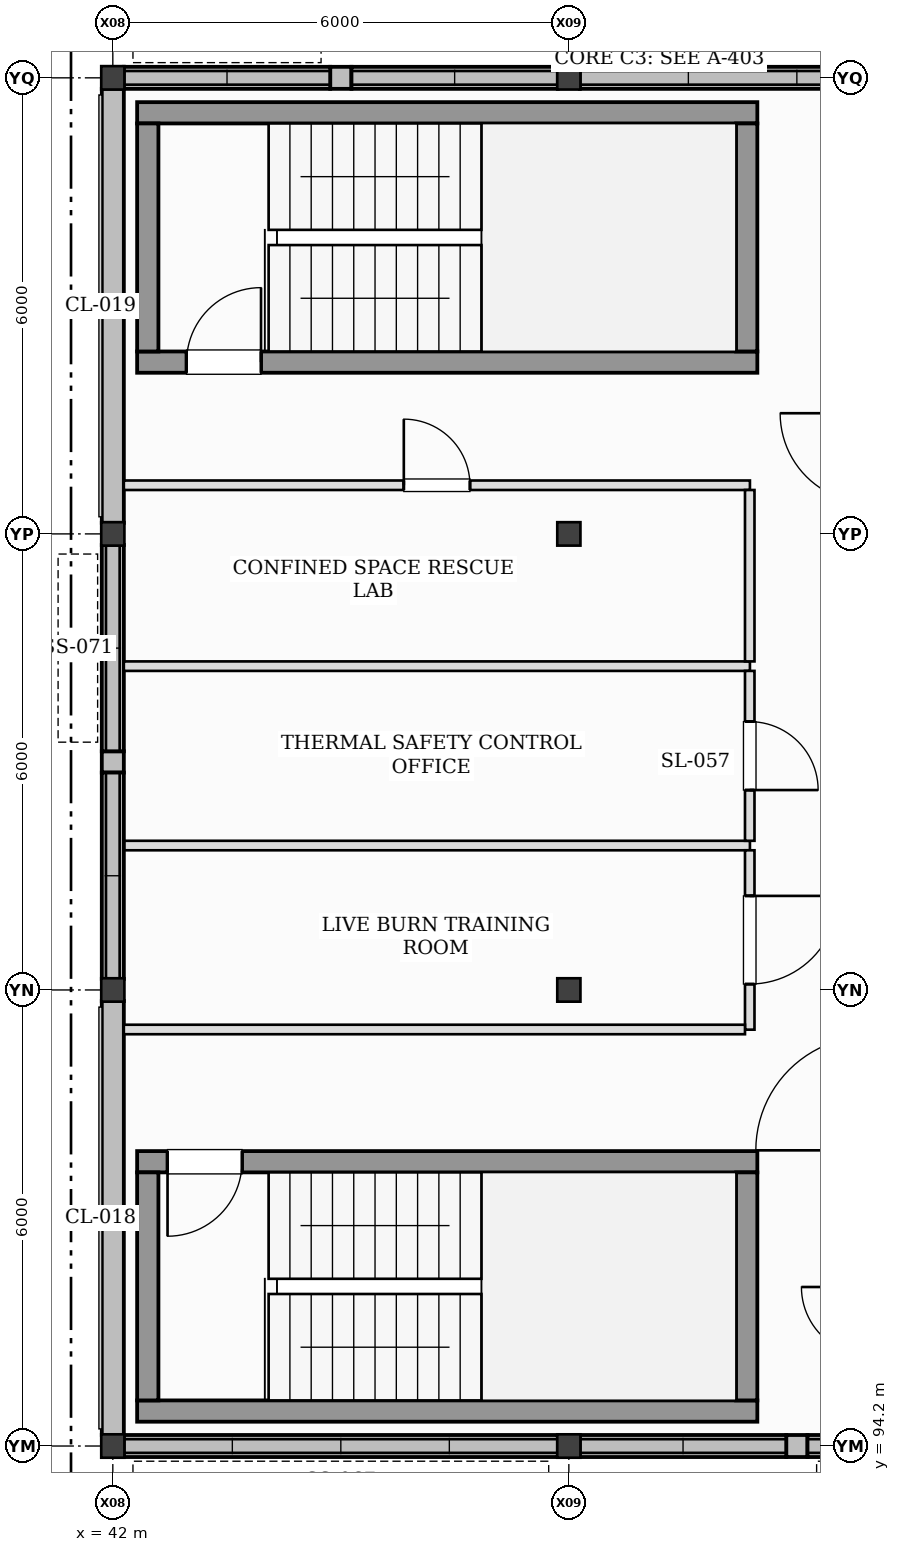
"""IFC4 building model, lengths in metres.
Left out: names, types, materials, properties, quantities, classifications, styles, units other than length and angle.
Written with IfcOpenShell. Run it as: python <this file> out.ifc"""

import sys

from ifc_helpers import new_model, si_unit, direction, frame, frame_2d, origin, origin_2d, place, context, subcontext, project, spatial, rectangle, i_section, extrude, element, fill, save


model = new_model("IFC4")
c1 = context("Model", 3, precision=1e-05, world=origin(), true_north=direction((0.0, 1.0)))
c2 = subcontext(c1, "Body", "Model", "MODEL_VIEW")
j1 = project(units=[si_unit("LENGTHUNIT", "METRE"), si_unit("PLANEANGLEUNIT", "RADIAN")], contexts=[c1])
p1 = place(None, origin())
s1 = spatial("IfcSite", under=j1, at=p1, CompositionType="ELEMENT")
p2 = place(p1, origin())
s2 = spatial("IfcBuilding", under=s1, at=p2, CompositionType="ELEMENT")
p3 = place(p2, frame((0.0, 0.0, 21.6)))
s3 = spatial("IfcBuildingStorey", under=s2, at=p3, CompositionType="ELEMENT", Elevation=21.6)
for number, where, z_axis, x_axis in (
    (1, (42.0, 94.2, 0.0), (0.0, 0.0, 1.0), (1.0, 0.0, 0.0)),
    (2, (42.0, 100.2, 0.0), (0.0, 0.0, 1.0), (1.0, 0.0, 0.0)),
    (3, (42.0, 106.2, 0.0), (0.0, 0.0, 1.0), (1.0, 0.0, 0.0)),
    (4, (42.0, 112.2, 0.0), (0.0, 0.0, 1.0), (1.0, 0.0, 0.0)),
    (5, (48.0, 94.2, 0.0), (0.0, 0.0, 1.0), (1.0, 0.0, 0.0)),
    (6, (48.0, 100.2, 0.0), (0.0, 0.0, 1.0), (1.0, 0.0, 0.0)),
    (7, (48.0, 106.2, 0.0), (0.0, 0.0, 1.0), (1.0, 0.0, 0.0)),
    (8, (48.0, 112.2, 0.0), (0.0, 0.0, 1.0), (1.0, 0.0, 0.0)),
):
    element("IfcColumn", number, at=place(p3, frame(where, z_axis=z_axis, x_axis=x_axis)), inside=s3, PredefinedType="COLUMN", context=c2, shape_type="SweptSolid", body=[
        extrude(i_section(OverallWidth=0.305, OverallDepth=0.308, WebThickness=0.01, FlangeThickness=0.015, at=origin_2d()), origin(), (0.0, 0.0, 1.0), 3.6),
    ])
p4 = place(p3, frame((42.145, 94.2, 0.0), z_axis=(0.0, 0.0, 1.0), x_axis=(1.0, 0.0, 0.0)))
e9 = element("IfcWall", 9, at=p4, inside=s3, PredefinedType="STANDARD", context=c2, shape_type="SweptSolid", body=[
    extrude(rectangle(XDim=5.71, YDim=0.29, at=frame_2d((2.855, 0.0))), origin(), (0.0, 0.0, 1.0), 0.32),
])
p5 = place(p3, frame((50.86, 94.2, 0.0), z_axis=(0.0, 0.0, 1.0), x_axis=(1.0, 0.0, 0.0)))
e10 = element("IfcWall", 10, at=p5, inside=s3, PredefinedType="STANDARD", context=c2, shape_type="SweptSolid", body=[
    extrude(rectangle(XDim=0.28, YDim=0.29, at=frame_2d((0.14, 0.0))), origin(), (0.0, 0.0, 1.0), 3.6),
])
p6 = place(p3, frame((48.145, 94.2, 0.0), z_axis=(0.0, 0.0, 1.0), x_axis=(1.0, 0.0, 0.0)))
e11 = element("IfcWall", 11, at=p6, inside=s3, PredefinedType="STANDARD", context=c2, shape_type="SweptSolid", body=[
    extrude(rectangle(XDim=2.715, YDim=0.29, at=frame_2d((1.357, 0.0))), origin(), (0.0, 0.0, 1.0), 0.44),
])
p7 = place(p3, frame((51.14, 94.2, 0.0), z_axis=(0.0, 0.0, 1.0), x_axis=(1.0, 0.0, 0.0)))
e12 = element("IfcWall", 12, at=p7, inside=s3, PredefinedType="STANDARD", context=c2, shape_type="SweptSolid", body=[
    extrude(rectangle(XDim=2.715, YDim=0.29, at=frame_2d((1.357, 0.0))), origin(), (0.0, 0.0, 1.0), 0.56),
])
p8 = place(p3, frame((45.14, 112.2, 0.0), z_axis=(0.0, 0.0, 1.0), x_axis=(-1.0, 0.0, 0.0)))
e13 = element("IfcWall", 13, at=p8, inside=s3, PredefinedType="STANDARD", context=c2, shape_type="SweptSolid", body=[
    extrude(rectangle(XDim=0.28, YDim=0.29, at=frame_2d((0.14, 0.0))), origin(), (0.0, 0.0, 1.0), 3.6),
])
p9 = place(p3, frame((47.855, 112.2, 0.0), z_axis=(0.0, 0.0, 1.0), x_axis=(-1.0, 0.0, 0.0)))
e14 = element("IfcWall", 14, at=p9, inside=s3, PredefinedType="STANDARD", context=c2, shape_type="SweptSolid", body=[
    extrude(rectangle(XDim=2.715, YDim=0.29, at=frame_2d((1.357, 0.0))), origin(), (0.0, 0.0, 1.0), 0.68),
])
p10 = place(p3, frame((44.86, 112.2, 0.0), z_axis=(0.0, 0.0, 1.0), x_axis=(-1.0, 0.0, 0.0)))
e15 = element("IfcWall", 15, at=p10, inside=s3, PredefinedType="STANDARD", context=c2, shape_type="SweptSolid", body=[
    extrude(rectangle(XDim=2.715, YDim=0.29, at=frame_2d((1.357, 0.0))), origin(), (0.0, 0.0, 1.0), 0.8),
])
p11 = place(p3, frame((53.855, 112.2, 0.0), z_axis=(0.0, 0.0, 1.0), x_axis=(-1.0, 0.0, 0.0)))
e16 = element("IfcWall", 16, at=p11, inside=s3, PredefinedType="STANDARD", context=c2, shape_type="SweptSolid", body=[
    extrude(rectangle(XDim=5.71, YDim=0.29, at=frame_2d((2.855, 0.0))), origin(), (0.0, 0.0, 1.0), 0.92),
])
p12 = place(p3, frame((42.0, 100.055, 0.0), z_axis=(0.0, 0.0, 1.0), x_axis=(0.0, -1.0, 0.0)))
e17 = element("IfcWall", 17, at=p12, inside=s3, PredefinedType="STANDARD", context=c2, shape_type="SweptSolid", body=[
    extrude(rectangle(XDim=5.71, YDim=0.29, at=frame_2d((2.855, 0.0))), origin(), (0.0, 0.0, 1.0), 2.813),
])
p13 = place(p3, frame((42.0, 103.34, 0.0), z_axis=(0.0, 0.0, 1.0), x_axis=(0.0, -1.0, 0.0)))
e18 = element("IfcWall", 18, at=p13, inside=s3, PredefinedType="STANDARD", context=c2, shape_type="SweptSolid", body=[
    extrude(rectangle(XDim=0.28, YDim=0.29, at=frame_2d((0.14, 0.0))), origin(), (0.0, 0.0, 1.0), 2.813),
])
p14 = place(p3, frame((42.0, 106.055, 0.0), z_axis=(0.0, 0.0, 1.0), x_axis=(0.0, -1.0, 0.0)))
e19 = element("IfcWall", 19, at=p14, inside=s3, PredefinedType="STANDARD", context=c2, shape_type="SweptSolid", body=[
    extrude(rectangle(XDim=2.715, YDim=0.29, at=frame_2d((1.357, 0.0))), origin(), (0.0, 0.0, 1.0), 0.32),
])
p15 = place(p3, frame((42.0, 103.06, 0.0), z_axis=(0.0, 0.0, 1.0), x_axis=(0.0, -1.0, 0.0)))
e20 = element("IfcWall", 20, at=p15, inside=s3, PredefinedType="STANDARD", context=c2, shape_type="SweptSolid", body=[
    extrude(rectangle(XDim=2.715, YDim=0.29, at=frame_2d((1.357, 0.0))), origin(), (0.0, 0.0, 1.0), 0.44),
])
p16 = place(p3, frame((42.0, 112.055, 0.0), z_axis=(0.0, 0.0, 1.0), x_axis=(0.0, -1.0, 0.0)))
e21 = element("IfcWall", 21, at=p16, inside=s3, PredefinedType="STANDARD", context=c2, shape_type="SweptSolid", body=[
    extrude(rectangle(XDim=5.71, YDim=0.29, at=frame_2d((2.855, 0.0))), origin(), (0.0, 0.0, 1.0), 3.6),
])
p17 = place(p3, frame((42.32, 94.66, 0.0), z_axis=(0.0, 0.0, 1.0), x_axis=(1.0, 0.0, 0.0)))
e22 = element("IfcWall", 22, at=p17, inside=s3, PredefinedType="SHEAR", context=c2, shape_type="SweptSolid", body=[
    extrude(rectangle(XDim=8.16, YDim=0.28, at=frame_2d((4.08, 0.0))), origin(), (0.0, 0.0, 1.0), 3.18),
])
p18 = place(p3, frame((50.48, 97.94, 0.0), z_axis=(0.0, 0.0, 1.0), x_axis=(-1.0, 0.0, 0.0)))
e23 = element("IfcWall", 23, at=p18, inside=s3, PredefinedType="SHEAR", context=c2, shape_type="SweptSolid", body=[
    extrude(rectangle(XDim=8.16, YDim=0.28, at=frame_2d((4.08, 0.0))), origin(), (0.0, 0.0, 1.0), 3.18),
])
p19 = place(p18, frame((6.78, 0.0, 0.0)))
e24 = element("IfcOpeningElement", 24, at=p19, cuts=e23, PredefinedType="OPENING", context=c2, shape_type="SweptSolid", body=[
    extrude(rectangle(XDim=0.98, YDim=2.15, at=frame_2d((0.49, 1.075))), frame((0.0, 0.15, 0.0), z_axis=(0.0, -1.0, 0.0), x_axis=(1.0, 0.0, 0.0)), (0.0, 0.0, 1.0), 0.3),
])
for number, where, z_axis, x_axis in (
    (25, (42.46, 97.8, 0.0), (0.0, 0.0, 1.0), (0.0, -1.0, 0.0)),
    (26, (50.34, 94.8, 0.0), (0.0, 0.0, 1.0), (0.0, 1.0, 0.0)),
):
    element("IfcWall", number, at=place(p3, frame(where, z_axis=z_axis, x_axis=x_axis)), inside=s3, PredefinedType="SHEAR", context=c2, shape_type="SweptSolid", body=[
        extrude(rectangle(XDim=3.0, YDim=0.28, at=frame_2d((1.5, 0.0))), origin(), (0.0, 0.0, 1.0), 3.18),
    ])
p20 = place(p3, frame((42.32, 108.46, 0.0), z_axis=(0.0, 0.0, 1.0), x_axis=(1.0, 0.0, 0.0)))
e27 = element("IfcWall", 27, at=p20, inside=s3, PredefinedType="SHEAR", context=c2, shape_type="SweptSolid", body=[
    extrude(rectangle(XDim=8.16, YDim=0.28, at=frame_2d((4.08, 0.0))), origin(), (0.0, 0.0, 1.0), 3.18),
])
p21 = place(p20, frame((0.65, 0.0, 0.0)))
e28 = element("IfcOpeningElement", 28, at=p21, cuts=e27, PredefinedType="OPENING", context=c2, shape_type="SweptSolid", body=[
    extrude(rectangle(XDim=0.98, YDim=2.15, at=frame_2d((0.49, 1.075))), frame((0.0, 0.15, 0.0), z_axis=(0.0, -1.0, 0.0), x_axis=(1.0, 0.0, 0.0)), (0.0, 0.0, 1.0), 0.3),
])
p22 = place(p3, frame((50.48, 111.74, 0.0), z_axis=(0.0, 0.0, 1.0), x_axis=(-1.0, 0.0, 0.0)))
e29 = element("IfcWall", 29, at=p22, inside=s3, PredefinedType="SHEAR", context=c2, shape_type="SweptSolid", body=[
    extrude(rectangle(XDim=8.16, YDim=0.28, at=frame_2d((4.08, 0.0))), origin(), (0.0, 0.0, 1.0), 3.18),
])
for number, where, z_axis, x_axis in (
    (30, (42.46, 111.6, 0.0), (0.0, 0.0, 1.0), (0.0, -1.0, 0.0)),
    (31, (50.34, 108.6, 0.0), (0.0, 0.0, 1.0), (0.0, 1.0, 0.0)),
):
    element("IfcWall", number, at=place(p3, frame(where, z_axis=z_axis, x_axis=x_axis)), inside=s3, PredefinedType="SHEAR", context=c2, shape_type="SweptSolid", body=[
        extrude(rectangle(XDim=3.0, YDim=0.28, at=frame_2d((1.5, 0.0))), origin(), (0.0, 0.0, 1.0), 3.18),
    ])
p23 = place(p3, frame((42.145, 102.1, 0.0), z_axis=(0.0, 0.0, 1.0), x_axis=(1.0, 0.0, 0.0)))
e32 = element("IfcWall", 32, at=p23, inside=s3, PredefinedType="PARTITIONING", context=c2, shape_type="SweptSolid", body=[
    extrude(rectangle(XDim=8.238, YDim=0.125, at=frame_2d((4.119, 0.0))), origin(), (0.0, 0.0, 1.0), 3.18),
])
p24 = place(p3, frame((50.38, 102.038, 0.0), z_axis=(0.0, 0.0, 1.0), x_axis=(0.0, -1.0, 0.0)))
e33 = element("IfcWall", 33, at=p24, inside=s3, PredefinedType="PARTITIONING", context=c2, shape_type="SweptSolid", body=[
    extrude(rectangle(XDim=2.36, YDim=0.125, at=frame_2d((1.18, 0.0))), origin(), (0.0, 0.0, 1.0), 3.18),
])
p25 = place(p24, frame((0.6, 0.0, 0.0)))
e34 = element("IfcOpeningElement", 34, at=p25, cuts=e33, PredefinedType="OPENING", context=c2, shape_type="SweptSolid", body=[
    extrude(rectangle(XDim=1.16, YDim=2.2, at=frame_2d((0.58, 1.1))), frame((0.0, 0.073, 0.0), z_axis=(0.0, -1.0, 0.0), x_axis=(1.0, 0.0, 0.0)), (0.0, 0.0, 1.0), 0.145),
])
p26 = place(p3, frame((50.317, 99.68, 0.0), z_axis=(0.0, 0.0, 1.0), x_axis=(-1.0, 0.0, 0.0)))
e35 = element("IfcWall", 35, at=p26, inside=s3, PredefinedType="PARTITIONING", context=c2, shape_type="SweptSolid", body=[
    extrude(rectangle(XDim=8.172, YDim=0.125, at=frame_2d((4.086, 0.0))), origin(), (0.0, 0.0, 1.0), 3.18),
])
p27 = place(p3, frame((42.145, 104.46, 0.0), z_axis=(0.0, 0.0, 1.0), x_axis=(1.0, 0.0, 0.0)))
e36 = element("IfcWall", 36, at=p27, inside=s3, PredefinedType="PARTITIONING", context=c2, shape_type="SweptSolid", body=[
    extrude(rectangle(XDim=8.238, YDim=0.125, at=frame_2d((4.119, 0.0))), origin(), (0.0, 0.0, 1.0), 3.18),
])
p28 = place(p3, frame((50.38, 104.397, 0.0), z_axis=(0.0, 0.0, 1.0), x_axis=(0.0, -1.0, 0.0)))
e37 = element("IfcWall", 37, at=p28, inside=s3, PredefinedType="PARTITIONING", context=c2, shape_type="SweptSolid", body=[
    extrude(rectangle(XDim=2.235, YDim=0.125, at=frame_2d((1.117, 0.0))), origin(), (0.0, 0.0, 1.0), 3.18),
])
p29 = place(p28, frame((0.667, 0.0, 0.0)))
e38 = element("IfcOpeningElement", 38, at=p29, cuts=e37, PredefinedType="OPENING", context=c2, shape_type="SweptSolid", body=[
    extrude(rectangle(XDim=0.9, YDim=2.1, at=frame_2d((0.45, 1.05))), frame((0.0, 0.073, 0.0), z_axis=(0.0, -1.0, 0.0), x_axis=(1.0, 0.0, 0.0)), (0.0, 0.0, 1.0), 0.145),
])
p30 = place(p3, frame((42.145, 106.84, 0.0), z_axis=(0.0, 0.0, 1.0), x_axis=(1.0, 0.0, 0.0)))
e39 = element("IfcWall", 39, at=p30, inside=s3, PredefinedType="PARTITIONING", context=c2, shape_type="SweptSolid", body=[
    extrude(rectangle(XDim=8.238, YDim=0.125, at=frame_2d((4.119, 0.0))), origin(), (0.0, 0.0, 1.0), 3.18),
])
p31 = place(p30, frame((3.684, 0.0, 0.0)))
e40 = element("IfcOpeningElement", 40, at=p31, cuts=e39, PredefinedType="OPENING", context=c2, shape_type="SweptSolid", body=[
    extrude(rectangle(XDim=0.87, YDim=2.06, at=frame_2d((0.435, 1.03))), frame((0.0, 0.073, 0.0), z_axis=(0.0, -1.0, 0.0), x_axis=(1.0, 0.0, 0.0)), (0.0, 0.0, 1.0), 0.145),
])
p32 = place(p3, frame((50.38, 106.778, 0.0), z_axis=(0.0, 0.0, 1.0), x_axis=(0.0, -1.0, 0.0)))
e41 = element("IfcWall", 41, at=p32, inside=s3, PredefinedType="PARTITIONING", context=c2, shape_type="SweptSolid", body=[
    extrude(rectangle(XDim=2.255, YDim=0.125, at=frame_2d((1.127, 0.0))), origin(), (0.0, 0.0, 1.0), 3.18),
])
p33 = place(p2, frame((0.0, 0.0, 25.2)))
p34 = place(p33, frame((0.0, 0.0, -0.42)))
p35 = place(p34, frame((44.5, 107.7, -0.01)))
p36 = place(p35, frame((0.0, 0.0, 0.37)))
e42 = element("IfcWindow", 42, at=p36, inside=s3, PartitioningType="SINGLE_PANEL", PredefinedType="SKYLIGHT", context=c2, shape_type="SweptSolid", body=[
    extrude(rectangle(XDim=1.55, YDim=1.55, at=origin_2d()), origin(), (0.0, 0.0, 1.0), 0.06),
])
p37 = place(p34, frame((48.0, 107.7, -0.01)))
p38 = place(p37, frame((0.0, 0.0, 0.37)))
e43 = element("IfcWindow", 43, at=p38, inside=s3, PartitioningType="SINGLE_PANEL", PredefinedType="SKYLIGHT", context=c2, shape_type="SweptSolid", body=[
    extrude(rectangle(XDim=1.75, YDim=1.35, at=origin_2d()), origin(), (0.0, 0.0, 1.0), 0.06),
])
p39 = place(p34, frame((51.5, 107.7, -0.01)))
p40 = place(p39, frame((0.0, 0.0, 0.37)))
e44 = element("IfcWindow", 44, at=p40, inside=s3, PartitioningType="SINGLE_PANEL", PredefinedType="SKYLIGHT", context=c2, shape_type="SweptSolid", body=[
    extrude(rectangle(XDim=1.95, YDim=1.48, at=origin_2d()), origin(), (0.0, 0.0, 1.0), 0.06),
])
p41 = place(p19, origin())
e45 = element("IfcDoor", 45, at=p41, inside=s3, OperationType="SINGLE_SWING_RIGHT", PredefinedType="DOOR", context=c2, shape_type="SweptSolid", body=[
    extrude(rectangle(XDim=0.98, YDim=2.15, at=frame_2d((0.49, 1.075))), frame((0.0, 0.025, 0.0), z_axis=(0.0, -1.0, 0.0), x_axis=(1.0, 0.0, 0.0)), (0.0, 0.0, 1.0), 0.05),
])
fill(e24, e45)
p42 = place(p21, origin())
e46 = element("IfcDoor", 46, at=p42, inside=s3, OperationType="SINGLE_SWING_RIGHT", PredefinedType="DOOR", context=c2, shape_type="SweptSolid", body=[
    extrude(rectangle(XDim=0.98, YDim=2.15, at=frame_2d((0.49, 1.075))), frame((0.0, 0.025, 0.0), z_axis=(0.0, -1.0, 0.0), x_axis=(1.0, 0.0, 0.0)), (0.0, 0.0, 1.0), 0.05),
])
fill(e28, e46)
p43 = place(p25, frame((1.16, 0.0, 0.0), z_axis=(0.0, 0.0, 1.0), x_axis=(-1.0, 0.0, 0.0)))
e47 = element("IfcDoor", 47, at=p43, inside=s3, OperationType="SINGLE_SWING_LEFT", PredefinedType="DOOR", context=c2, shape_type="SweptSolid", body=[
    extrude(rectangle(XDim=1.16, YDim=2.2, at=frame_2d((0.58, 1.1))), frame((0.0, 0.025, 0.0), z_axis=(0.0, -1.0, 0.0), x_axis=(1.0, 0.0, 0.0)), (0.0, 0.0, 1.0), 0.05),
])
fill(e34, e47)
p44 = place(p29, frame((0.9, 0.0, 0.0), z_axis=(0.0, 0.0, 1.0), x_axis=(-1.0, 0.0, 0.0)))
e48 = element("IfcDoor", 48, at=p44, inside=s3, OperationType="SINGLE_SWING_RIGHT", PredefinedType="DOOR", context=c2, shape_type="SweptSolid", body=[
    extrude(rectangle(XDim=0.9, YDim=2.1, at=frame_2d((0.45, 1.05))), frame((0.0, 0.025, 0.0), z_axis=(0.0, -1.0, 0.0), x_axis=(1.0, 0.0, 0.0)), (0.0, 0.0, 1.0), 0.05),
])
fill(e38, e48)
p45 = place(p31, frame((0.87, 0.0, 0.0), z_axis=(0.0, 0.0, 1.0), x_axis=(-1.0, 0.0, 0.0)))
e49 = element("IfcDoor", 49, at=p45, inside=s3, OperationType="SINGLE_SWING_LEFT", PredefinedType="DOOR", context=c2, shape_type="SweptSolid", body=[
    extrude(rectangle(XDim=0.87, YDim=2.06, at=frame_2d((0.435, 1.03))), frame((0.0, 0.025, 0.0), z_axis=(0.0, -1.0, 0.0), x_axis=(1.0, 0.0, 0.0)), (0.0, 0.0, 1.0), 0.05),
])
fill(e40, e49)
save(model, sys.argv[1])
